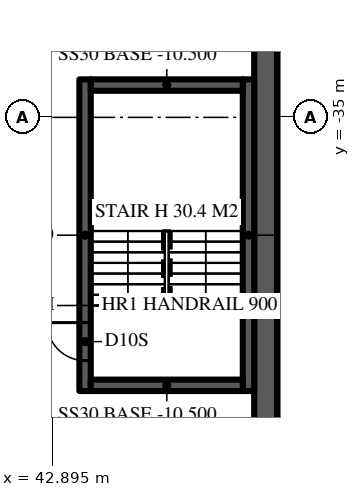
"""IFC4 building model, lengths in metres.
Left out: names, types, materials, properties, quantities, classifications, styles, units other than length and angle.
Written with IfcOpenShell. Run it as: python <this file> out.ifc"""

import sys

from ifc_helpers import new_model, si_unit, direction, frame, frame_2d, origin, place, context, subcontext, project, spatial, rectangle, extrude, element, fill, save


model = new_model("IFC4")
c1 = context("Model", 3, precision=1e-05, world=origin(), true_north=direction((0.0, 1.0)))
c2 = subcontext(c1, "Body", "Model", "MODEL_VIEW")
j1 = project(units=[si_unit("LENGTHUNIT", "METRE"), si_unit("PLANEANGLEUNIT", "RADIAN")], contexts=[c1])
p1 = place(None, origin())
s1 = spatial("IfcSite", under=j1, at=p1, CompositionType="ELEMENT")
p2 = place(p1, origin())
s2 = spatial("IfcBuilding", under=s1, at=p2, CompositionType="ELEMENT")
p3 = place(p2, frame((0.0, 0.0, -10.0)))
s3 = spatial("IfcBuildingStorey", under=s2, at=p3, CompositionType="ELEMENT", Elevation=-10.0)
p4 = place(p3, frame((48.5, -48.2, -0.5), z_axis=(0.0, 0.0, 1.0), x_axis=(0.0, 1.0, 0.0)))
e1 = element("IfcWall", 1, at=p4, inside=s3, PredefinedType="SOLIDWALL", context=c2, shape_type="SweptSolid", body=[
    extrude(rectangle(XDim=96.4, YDim=0.6, at=frame_2d((48.2, 0.0))), origin(), (0.0, 0.0, 1.0), 10.1),
])
p5 = place(p3, frame((43.75, -42.2, -0.5), z_axis=(0.0, 0.0, 1.0), x_axis=(0.0, 1.0, 0.0)))
e2 = element("IfcWall", 2, at=p5, inside=s3, PredefinedType="SOLIDWALL", context=c2, shape_type="SweptSolid", body=[
    extrude(rectangle(XDim=8.2, YDim=0.3, at=frame_2d((4.1, 0.0))), origin(), (0.0, 0.0, 1.0), 5.2),
])
p6 = place(p5, frame((0.8, 0.0, 0.5)))
e3 = element("IfcOpeningElement", 3, at=p6, cuts=e2, PredefinedType="OPENING", context=c2, shape_type="SweptSolid", body=[
    extrude(rectangle(XDim=1.0, YDim=2.2, at=frame_2d((0.5, 1.1))), frame((0.0, 0.16, 0.0), z_axis=(0.0, -1.0, 0.0), x_axis=(1.0, 0.0, 0.0)), (0.0, 0.0, 1.0), 0.32),
])
p7 = place(p3, frame((48.05, -34.0, -0.5), z_axis=(0.0, 0.0, 1.0), x_axis=(0.0, -1.0, 0.0)))
e4 = element("IfcWall", 4, at=p7, inside=s3, PredefinedType="SOLIDWALL", context=c2, shape_type="SweptSolid", body=[
    extrude(rectangle(XDim=8.2, YDim=0.3, at=frame_2d((4.1, 0.0))), origin(), (0.0, 0.0, 1.0), 5.2),
])
for number, where, z_axis, x_axis in (
    (5, (43.9, -42.05, -0.5), (0.0, 0.0, 1.0), (1.0, 0.0, 0.0)),
    (6, (47.9, -34.15, -0.5), (0.0, 0.0, 1.0), (-1.0, 0.0, 0.0)),
):
    element("IfcWall", number, at=place(p3, frame(where, z_axis=z_axis, x_axis=x_axis)), inside=s3, PredefinedType="SOLIDWALL", context=c2, shape_type="SweptSolid", body=[
        extrude(rectangle(XDim=4.0, YDim=0.3, at=frame_2d((2.0, 0.0))), origin(), (0.0, 0.0, 1.0), 5.2),
    ])
p8 = place(p6, origin())
e7 = element("IfcDoor", 7, at=p8, inside=s3, OperationType="SINGLE_SWING_RIGHT", PredefinedType="DOOR", context=c2, shape_type="SweptSolid", body=[
    extrude(rectangle(XDim=1.0, YDim=2.2, at=frame_2d((0.5, 1.1))), frame((0.0, 0.025, 0.0), z_axis=(0.0, -1.0, 0.0), x_axis=(1.0, 0.0, 0.0)), (0.0, 0.0, 1.0), 0.05),
])
fill(e3, e7)
save(model, sys.argv[1])
